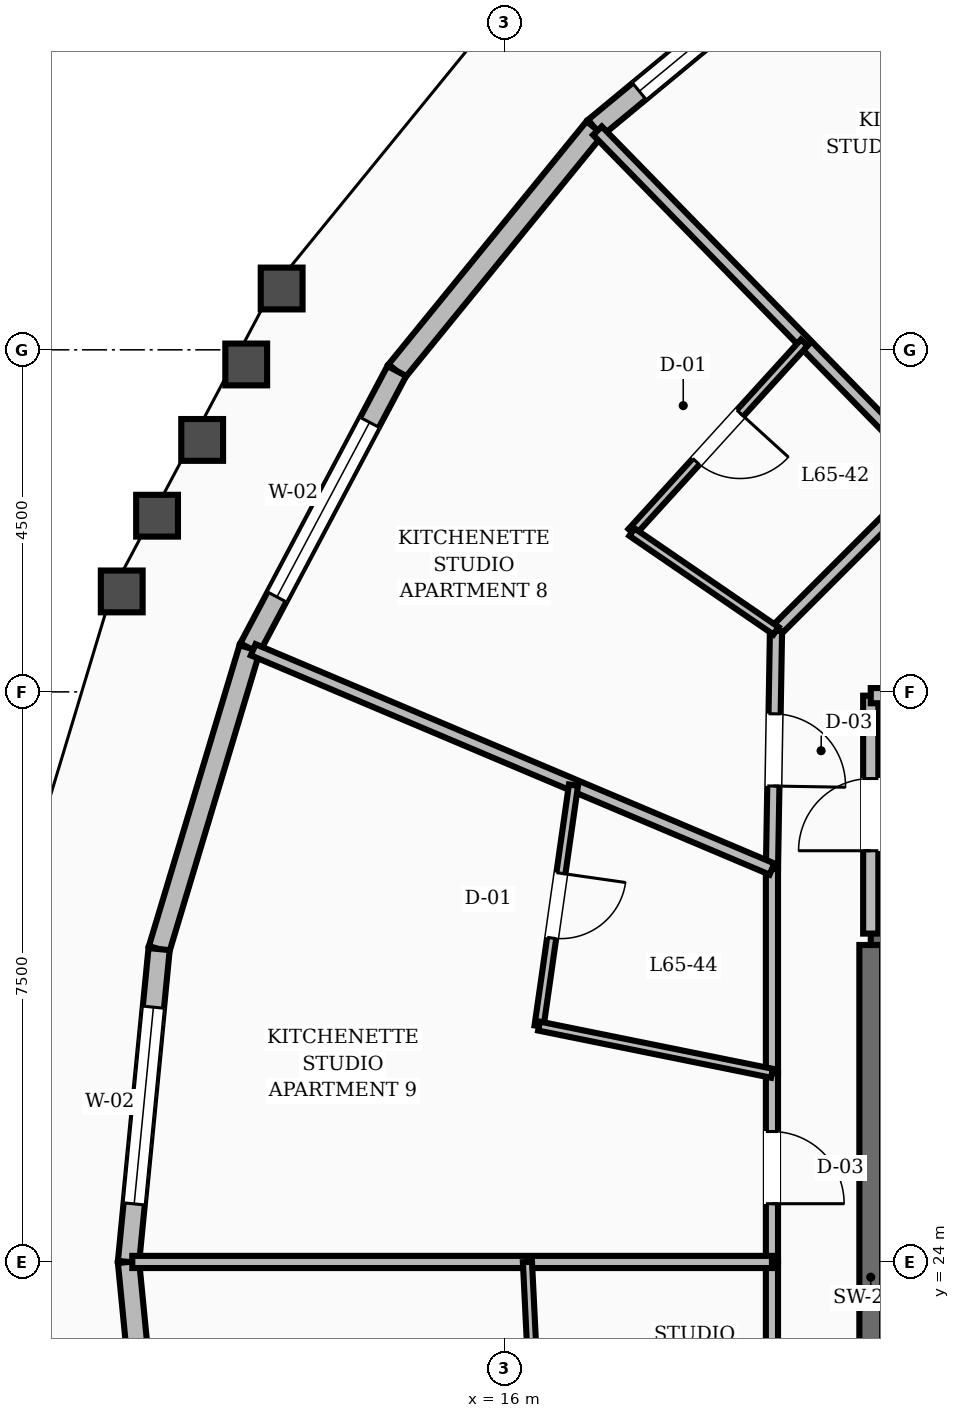
"""IFC4 building model, lengths in metres.
Left out: names, types, materials, properties, quantities, classifications, styles, units other than length and angle.
Written with IfcOpenShell. Run it as: python <this file> out.ifc"""

import sys

from ifc_helpers import new_model, si_unit, direction, frame, frame_2d, origin, place, context, subcontext, project, spatial, rectangle, extrude, element, fill, save


model = new_model("IFC4")
c1 = context("Model", 3, precision=1e-05, world=origin(), true_north=direction((0.0, 1.0)))
c2 = subcontext(c1, "Body", "Model", "MODEL_VIEW")
j1 = project(units=[si_unit("LENGTHUNIT", "METRE"), si_unit("PLANEANGLEUNIT", "RADIAN")], contexts=[c1])
p1 = place(None, origin())
s1 = spatial("IfcSite", under=j1, at=p1, CompositionType="ELEMENT")
p2 = place(p1, origin())
s2 = spatial("IfcBuilding", under=s1, at=p2, CompositionType="ELEMENT")
p3 = place(p2, frame((0.0, 0.0, 250.8)))
s3 = spatial("IfcBuildingStorey", under=s2, at=p3, CompositionType="ELEMENT", Elevation=250.8)
p4 = place(p3, frame((20.82, 19.43, 0.0), z_axis=(0.0, 0.0, 1.0), x_axis=(0.0, 1.0, 0.0)))
e1 = element("IfcWall", 1, at=p4, inside=s3, PredefinedType="SHEAR", context=c2, shape_type="SweptSolid", body=[
    extrude(rectangle(XDim=8.74, YDim=0.3, at=frame_2d((4.37, 0.0))), origin(), (0.0, 0.0, 1.0), 3.6),
])
p5 = place(p3, frame((20.82, 28.32, 0.0), z_axis=(0.0, 0.0, 1.0), x_axis=(1.0, 0.0, 0.0)))
e2 = element("IfcWall", 2, at=p5, inside=s3, PredefinedType="SHEAR", context=c2, shape_type="SweptSolid", body=[
    extrude(rectangle(XDim=3.6, YDim=0.3, at=frame_2d((1.8, 0.0))), origin(), (0.0, 0.0, 1.0), 3.6),
])
p6 = place(p3, frame((20.364, 41.542, 0.0), z_axis=(0.0, 0.0, 1.0), x_axis=(-0.770756680857, -0.637129609197, 0.0)))
e3 = element("IfcWall", 3, at=p6, inside=s3, PredefinedType="STANDARD", context=c2, shape_type="SweptSolid", body=[
    extrude(rectangle(XDim=4.118, YDim=0.28, at=frame_2d((2.059, 0.0))), origin(), (0.0, 0.0, 1.0), 2.88),
])
p7 = place(p6, frame((0.759, 0.0, 0.8)))
e4 = element("IfcOpeningElement", 4, at=p7, cuts=e3, PredefinedType="OPENING", context=c2, shape_type="SweptSolid", body=[
    extrude(rectangle(XDim=2.6, YDim=1.65, at=frame_2d((1.3, 0.825))), frame((0.0, 0.15, 0.0), z_axis=(0.0, -1.0, 0.0), x_axis=(1.0, 0.0, 0.0)), (0.0, 0.0, 1.0), 0.3),
])
p8 = place(p3, frame((17.189, 38.918, 0.0), z_axis=(0.0, 0.0, 1.0), x_axis=(-0.631637370097, -0.775263976138, 0.0)))
e5 = element("IfcWall", 5, at=p8, inside=s3, PredefinedType="STANDARD", context=c2, shape_type="SweptSolid", body=[
    extrude(rectangle(XDim=4.124, YDim=0.28, at=frame_2d((2.062, 0.0))), origin(), (0.0, 0.0, 1.0), 2.88),
])
p9 = place(p3, frame((14.585, 35.721, 0.0), z_axis=(0.0, 0.0, 1.0), x_axis=(-0.468745936162, -0.883333033081, 0.0)))
e6 = element("IfcWall", 6, at=p9, inside=s3, PredefinedType="STANDARD", context=c2, shape_type="SweptSolid", body=[
    extrude(rectangle(XDim=4.129, YDim=0.28, at=frame_2d((2.064, 0.0))), origin(), (0.0, 0.0, 1.0), 2.88),
])
p10 = place(p9, frame((0.765, 0.0, 0.8)))
e7 = element("IfcOpeningElement", 7, at=p10, cuts=e6, PredefinedType="OPENING", context=c2, shape_type="SweptSolid", body=[
    extrude(rectangle(XDim=2.6, YDim=1.65, at=frame_2d((1.3, 0.825))), frame((0.0, 0.15, 0.0), z_axis=(0.0, -1.0, 0.0), x_axis=(1.0, 0.0, 0.0)), (0.0, 0.0, 1.0), 0.3),
])
p11 = place(p3, frame((12.649, 32.074, 0.0), z_axis=(0.0, 0.0, 1.0), x_axis=(-0.288361061872, -0.957521748054, 0.0)))
e8 = element("IfcWall", 8, at=p11, inside=s3, PredefinedType="STANDARD", context=c2, shape_type="SweptSolid", body=[
    extrude(rectangle(XDim=4.133, YDim=0.28, at=frame_2d((2.067, 0.0))), origin(), (0.0, 0.0, 1.0), 2.88),
])
p12 = place(p3, frame((11.457, 28.116, 0.0), z_axis=(0.0, 0.0, 1.0), x_axis=(-0.097346706508, -0.995250530636, 0.0)))
e9 = element("IfcWall", 9, at=p12, inside=s3, PredefinedType="STANDARD", context=c2, shape_type="SweptSolid", body=[
    extrude(rectangle(XDim=4.135, YDim=0.28, at=frame_2d((2.068, 0.0))), origin(), (0.0, 0.0, 1.0), 2.88),
])
p13 = place(p12, frame((0.768, 0.0, 0.8)))
e10 = element("IfcOpeningElement", 10, at=p13, cuts=e9, PredefinedType="OPENING", context=c2, shape_type="SweptSolid", body=[
    extrude(rectangle(XDim=2.6, YDim=1.65, at=frame_2d((1.3, 0.825))), frame((0.0, 0.15, 0.0), z_axis=(0.0, -1.0, 0.0), x_axis=(1.0, 0.0, 0.0)), (0.0, 0.0, 1.0), 0.3),
])
p14 = place(p3, frame((11.055, 24.0, 0.0), z_axis=(0.0, 0.0, 1.0), x_axis=(0.097346706508, -0.995250530636, 0.0)))
e11 = element("IfcWall", 11, at=p14, inside=s3, PredefinedType="STANDARD", context=c2, shape_type="SweptSolid", body=[
    extrude(rectangle(XDim=4.135, YDim=0.28, at=frame_2d((2.068, 0.0))), origin(), (0.0, 0.0, 1.0), 2.88),
])
p15 = place(p3, frame((20.82, 28.32, 0.0), z_axis=(0.0, 0.0, 1.0), x_axis=(0.0, 1.0, 0.0)))
e12 = element("IfcWall", 12, at=p15, inside=s3, PredefinedType="SOLIDWALL", context=c2, shape_type="SweptSolid", body=[
    extrude(rectangle(XDim=3.13, YDim=0.2, at=frame_2d((1.565, 0.0))), origin(), (0.0, 0.0, 1.0), 2.87),
])
p16 = place(p15, frame((1.09, 0.0, 0.0)))
e13 = element("IfcOpeningElement", 13, at=p16, cuts=e12, PredefinedType="OPENING", context=c2, shape_type="SweptSolid", body=[
    extrude(rectangle(XDim=0.95, YDim=2.1, at=frame_2d((0.475, 1.05))), frame((0.0, 0.11, 0.0), z_axis=(0.0, -1.0, 0.0), x_axis=(1.0, 0.0, 0.0)), (0.0, 0.0, 1.0), 0.22),
])
p17 = place(p3, frame((20.82, 31.45, 0.0), z_axis=(0.0, 0.0, 1.0), x_axis=(1.0, 0.0, 0.0)))
e14 = element("IfcWall", 14, at=p17, inside=s3, PredefinedType="SOLIDWALL", context=c2, shape_type="SweptSolid", body=[
    extrude(rectangle(XDim=3.98, YDim=0.2, at=frame_2d((1.99, 0.0))), origin(), (0.0, 0.0, 1.0), 2.87),
])
p18 = place(p3, frame((21.635, 34.365, 0.0), z_axis=(0.0, 0.0, 1.0), x_axis=(-0.707106781187, -0.707106781187, 0.0)))
e15 = element("IfcWall", 15, at=p18, inside=s3, PredefinedType="SOLIDWALL", context=c2, shape_type="SweptSolid", body=[
    extrude(rectangle(XDim=2.916, YDim=0.16, at=frame_2d((1.458, 0.0))), origin(), (0.0, 0.0, 1.0), 2.87),
])
p19 = place(p3, frame((19.573, 32.303, 0.0), z_axis=(0.0, 0.0, 1.0), x_axis=(-0.016981035134, -0.999855811828, 0.0)))
e16 = element("IfcWall", 16, at=p19, inside=s3, PredefinedType="SOLIDWALL", context=c2, shape_type="SweptSolid", body=[
    extrude(rectangle(XDim=3.134, YDim=0.16, at=frame_2d((1.567, 0.0))), origin(), (0.0, 0.0, 1.0), 2.87),
])
p20 = place(p19, frame((1.092, 0.0, 0.0)))
e17 = element("IfcOpeningElement", 17, at=p20, cuts=e16, PredefinedType="OPENING", context=c2, shape_type="SweptSolid", body=[
    extrude(rectangle(XDim=0.95, YDim=2.1, at=frame_2d((0.475, 1.05))), frame((0.0, 0.09, 0.0), z_axis=(0.0, -1.0, 0.0), x_axis=(1.0, 0.0, 0.0)), (0.0, 0.0, 1.0), 0.18),
])
p21 = place(p3, frame((19.52, 29.169, 0.0), z_axis=(0.0, 0.0, 1.0), x_axis=(0.0, -1.0, 0.0)))
e18 = element("IfcWall", 18, at=p21, inside=s3, PredefinedType="SOLIDWALL", context=c2, shape_type="SweptSolid", body=[
    extrude(rectangle(XDim=2.687, YDim=0.16, at=frame_2d((1.344, 0.0))), origin(), (0.0, 0.0, 1.0), 2.87),
])
p22 = place(p3, frame((19.52, 26.482, 0.0), z_axis=(0.0, 0.0, 1.0), x_axis=(0.0, -1.0, 0.0)))
e19 = element("IfcWall", 19, at=p22, inside=s3, PredefinedType="SOLIDWALL", context=c2, shape_type="SweptSolid", body=[
    extrude(rectangle(XDim=2.482, YDim=0.16, at=frame_2d((1.241, 0.0))), origin(), (0.0, 0.0, 1.0), 2.87),
])
p23 = place(p22, frame((0.766, 0.0, 0.0)))
e20 = element("IfcOpeningElement", 20, at=p23, cuts=e19, PredefinedType="OPENING", context=c2, shape_type="SweptSolid", body=[
    extrude(rectangle(XDim=0.95, YDim=2.1, at=frame_2d((0.475, 1.05))), frame((0.0, 0.09, 0.0), z_axis=(0.0, -1.0, 0.0), x_axis=(1.0, 0.0, 0.0)), (0.0, 0.0, 1.0), 0.18),
])
p24 = place(p3, frame((19.52, 24.0, 0.0), z_axis=(0.0, 0.0, 1.0), x_axis=(0.0, -1.0, 0.0)))
e21 = element("IfcWall", 21, at=p24, inside=s3, PredefinedType="SOLIDWALL", context=c2, shape_type="SweptSolid", body=[
    extrude(rectangle(XDim=2.482, YDim=0.16, at=frame_2d((1.241, 0.0))), origin(), (0.0, 0.0, 1.0), 2.87),
])
p25 = place(p3, frame((21.635, 34.365, 0.0), z_axis=(0.0, 0.0, 1.0), x_axis=(-0.698587637664, 0.715524501679, 0.0)))
e22 = element("IfcWall", 22, at=p25, inside=s3, PredefinedType="SOLIDWALL", context=c2, shape_type="SweptSolid", body=[
    extrude(rectangle(XDim=6.314, YDim=0.16, at=frame_2d((3.157, 0.0))), origin(), (0.0, 0.0, 1.0), 2.87),
])
p26 = place(p3, frame((19.946, 36.095, 0.0), z_axis=(0.0, 0.0, 1.0), x_axis=(-0.672964763425, -0.739674541395, 0.0)))
e23 = element("IfcWall", 23, at=p26, inside=s3, PredefinedType="PARTITIONING", context=c2, shape_type="SweptSolid", body=[
    extrude(rectangle(XDim=3.371, YDim=0.12, at=frame_2d((1.685, 0.0))), origin(), (0.0, 0.0, 1.0), 2.87),
])
p27 = place(p26, frame((1.255, 0.0, 0.0)))
e24 = element("IfcOpeningElement", 24, at=p27, cuts=e23, PredefinedType="OPENING", context=c2, shape_type="SweptSolid", body=[
    extrude(rectangle(XDim=0.86, YDim=2.1, at=frame_2d((0.43, 1.05))), frame((0.0, 0.07, 0.0), z_axis=(0.0, -1.0, 0.0), x_axis=(1.0, 0.0, 0.0)), (0.0, 0.0, 1.0), 0.14),
])
p28 = place(p3, frame((19.573, 32.303, 0.0), z_axis=(0.0, 0.0, 1.0), x_axis=(-0.824955305645, 0.565197968581, 0.0)))
e25 = element("IfcWall", 25, at=p28, inside=s3, PredefinedType="PARTITIONING", context=c2, shape_type="SweptSolid", body=[
    extrude(rectangle(XDim=2.298, YDim=0.12, at=frame_2d((1.149, 0.0))), origin(), (0.0, 0.0, 1.0), 2.87),
])
p29 = place(p3, frame((19.52, 29.169, 0.0), z_axis=(0.0, 0.0, 1.0), x_axis=(-0.921093629339, 0.38934114346, 0.0)))
e26 = element("IfcWall", 26, at=p29, inside=s3, PredefinedType="SOLIDWALL", context=c2, shape_type="SweptSolid", body=[
    extrude(rectangle(XDim=7.409, YDim=0.16, at=frame_2d((3.705, 0.0))), origin(), (0.0, 0.0, 1.0), 2.87),
])
p30 = place(p3, frame((16.909, 30.273, 0.0), z_axis=(0.0, 0.0, 1.0), x_axis=(-0.141432030345, -0.98994796873, 0.0)))
e27 = element("IfcWall", 27, at=p30, inside=s3, PredefinedType="PARTITIONING", context=c2, shape_type="SweptSolid", body=[
    extrude(rectangle(XDim=3.202, YDim=0.12, at=frame_2d((1.601, 0.0))), origin(), (0.0, 0.0, 1.0), 2.87),
])
p31 = place(p30, frame((1.171, 0.0, 0.0)))
e28 = element("IfcOpeningElement", 28, at=p31, cuts=e27, PredefinedType="OPENING", context=c2, shape_type="SweptSolid", body=[
    extrude(rectangle(XDim=0.86, YDim=2.1, at=frame_2d((0.43, 1.05))), frame((0.0, 0.07, 0.0), z_axis=(0.0, -1.0, 0.0), x_axis=(1.0, 0.0, 0.0)), (0.0, 0.0, 1.0), 0.14),
])
p32 = place(p3, frame((19.52, 26.482, 0.0), z_axis=(0.0, 0.0, 1.0), x_axis=(-0.980094066387, 0.198533677325, 0.0)))
e29 = element("IfcWall", 29, at=p32, inside=s3, PredefinedType="PARTITIONING", context=c2, shape_type="SweptSolid", body=[
    extrude(rectangle(XDim=3.126, YDim=0.12, at=frame_2d((1.563, 0.0))), origin(), (0.0, 0.0, 1.0), 2.87),
])
p33 = place(p3, frame((19.52, 24.0, 0.0), z_axis=(0.0, 0.0, 1.0), x_axis=(-1.0, 0.0, 0.0)))
e30 = element("IfcWall", 30, at=p33, inside=s3, PredefinedType="SOLIDWALL", context=c2, shape_type="SweptSolid", body=[
    extrude(rectangle(XDim=8.415, YDim=0.16, at=frame_2d((4.208, 0.0))), origin(), (0.0, 0.0, 1.0), 2.87),
])
p34 = place(p3, frame((16.303, 24.0, 0.0), z_axis=(0.0, 0.0, 1.0), x_axis=(0.049271319057, -0.99878543097, 0.0)))
e31 = element("IfcWall", 31, at=p34, inside=s3, PredefinedType="PARTITIONING", context=c2, shape_type="SweptSolid", body=[
    extrude(rectangle(XDim=3.107, YDim=0.12, at=frame_2d((1.553, 0.0))), origin(), (0.0, 0.0, 1.0), 2.87),
])
p35 = place(p34, frame((1.124, 0.0, 0.0)))
e32 = element("IfcOpeningElement", 32, at=p35, cuts=e31, PredefinedType="OPENING", context=c2, shape_type="SweptSolid", body=[
    extrude(rectangle(XDim=0.86, YDim=2.1, at=frame_2d((0.43, 1.05))), frame((0.0, 0.07, 0.0), z_axis=(0.0, -1.0, 0.0), x_axis=(1.0, 0.0, 0.0)), (0.0, 0.0, 1.0), 0.14),
])
p36 = place(p7, origin())
e33 = element("IfcWindow", 33, at=p36, inside=s3, PartitioningType="SINGLE_PANEL", PredefinedType="WINDOW", context=c2, shape_type="SweptSolid", body=[
    extrude(rectangle(XDim=2.6, YDim=1.65, at=frame_2d((1.3, 0.825))), frame((0.0, 0.03, 0.0), z_axis=(0.0, -1.0, 0.0), x_axis=(1.0, 0.0, 0.0)), (0.0, 0.0, 1.0), 0.06),
])
fill(e4, e33)
p37 = place(p10, origin())
e34 = element("IfcWindow", 34, at=p37, inside=s3, PartitioningType="SINGLE_PANEL", PredefinedType="WINDOW", context=c2, shape_type="SweptSolid", body=[
    extrude(rectangle(XDim=2.6, YDim=1.65, at=frame_2d((1.3, 0.825))), frame((0.0, 0.03, 0.0), z_axis=(0.0, -1.0, 0.0), x_axis=(1.0, 0.0, 0.0)), (0.0, 0.0, 1.0), 0.06),
])
fill(e7, e34)
p38 = place(p13, origin())
e35 = element("IfcWindow", 35, at=p38, inside=s3, PartitioningType="SINGLE_PANEL", PredefinedType="WINDOW", context=c2, shape_type="SweptSolid", body=[
    extrude(rectangle(XDim=2.6, YDim=1.65, at=frame_2d((1.3, 0.825))), frame((0.0, 0.03, 0.0), z_axis=(0.0, -1.0, 0.0), x_axis=(1.0, 0.0, 0.0)), (0.0, 0.0, 1.0), 0.06),
])
fill(e10, e35)
p39 = place(p16, origin())
e36 = element("IfcDoor", 36, at=p39, inside=s3, OperationType="SINGLE_SWING_LEFT", PredefinedType="DOOR", context=c2, shape_type="SweptSolid", body=[
    extrude(rectangle(XDim=0.95, YDim=2.1, at=frame_2d((0.475, 1.05))), frame((0.0, 0.025, 0.0), z_axis=(0.0, -1.0, 0.0), x_axis=(1.0, 0.0, 0.0)), (0.0, 0.0, 1.0), 0.05),
])
fill(e13, e36)
p40 = place(p27, origin())
e37 = element("IfcDoor", 37, at=p40, inside=s3, OperationType="SINGLE_SWING_LEFT", PredefinedType="DOOR", context=c2, shape_type="SweptSolid", body=[
    extrude(rectangle(XDim=0.86, YDim=2.1, at=frame_2d((0.43, 1.05))), frame((0.0, 0.025, 0.0), z_axis=(0.0, -1.0, 0.0), x_axis=(1.0, 0.0, 0.0)), (0.0, 0.0, 1.0), 0.05),
])
fill(e24, e37)
p41 = place(p20, origin())
e38 = element("IfcDoor", 38, at=p41, inside=s3, OperationType="SINGLE_SWING_RIGHT", PredefinedType="DOOR", context=c2, shape_type="SweptSolid", body=[
    extrude(rectangle(XDim=0.95, YDim=2.1, at=frame_2d((0.475, 1.05))), frame((0.0, 0.025, 0.0), z_axis=(0.0, -1.0, 0.0), x_axis=(1.0, 0.0, 0.0)), (0.0, 0.0, 1.0), 0.05),
])
fill(e17, e38)
p42 = place(p31, origin())
e39 = element("IfcDoor", 39, at=p42, inside=s3, OperationType="SINGLE_SWING_LEFT", PredefinedType="DOOR", context=c2, shape_type="SweptSolid", body=[
    extrude(rectangle(XDim=0.86, YDim=2.1, at=frame_2d((0.43, 1.05))), frame((0.0, 0.025, 0.0), z_axis=(0.0, -1.0, 0.0), x_axis=(1.0, 0.0, 0.0)), (0.0, 0.0, 1.0), 0.05),
])
fill(e28, e39)
p43 = place(p23, origin())
e40 = element("IfcDoor", 40, at=p43, inside=s3, OperationType="SINGLE_SWING_RIGHT", PredefinedType="DOOR", context=c2, shape_type="SweptSolid", body=[
    extrude(rectangle(XDim=0.95, YDim=2.1, at=frame_2d((0.475, 1.05))), frame((0.0, 0.025, 0.0), z_axis=(0.0, -1.0, 0.0), x_axis=(1.0, 0.0, 0.0)), (0.0, 0.0, 1.0), 0.05),
])
fill(e20, e40)
save(model, sys.argv[1])
